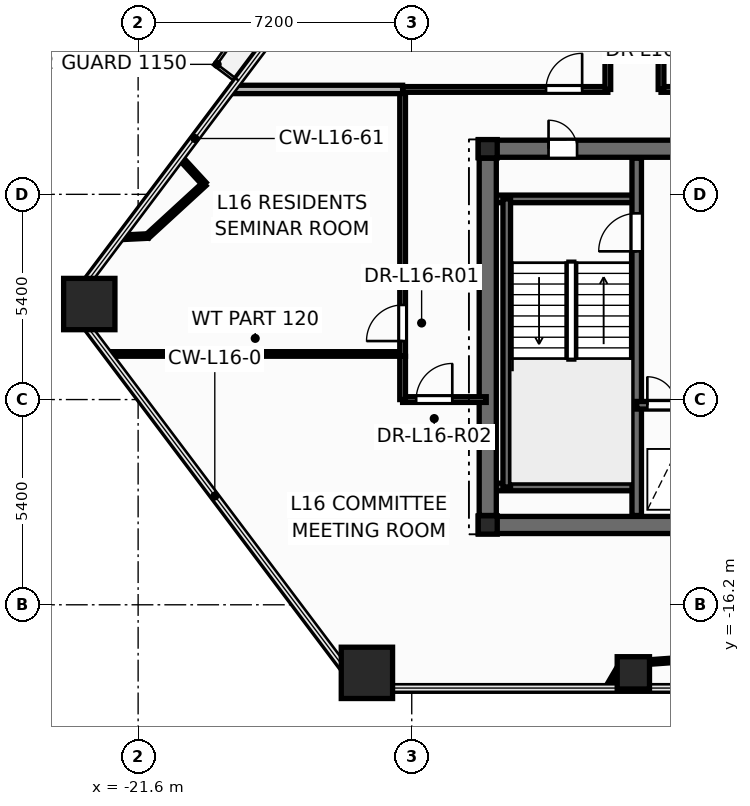
"""IFC4 building model, lengths in metres.
Left out: names, types, materials, properties, quantities, classifications, styles, units other than length and angle.
Written with IfcOpenShell. Run it as: python <this file> out.ifc"""

import sys

from ifc_helpers import new_model, si_unit, direction, frame, frame_2d, origin, origin_2d, place, context, subcontext, project, spatial, rectangle, hollow_rectangle, hollow_circle, i_section, extrude, element, fill, save


model = new_model("IFC4")
c1 = context("Model", 3, precision=1e-05, world=origin(), true_north=direction((0.0, 1.0)))
c2 = subcontext(c1, "Body", "Model", "MODEL_VIEW")
j1 = project(units=[si_unit("LENGTHUNIT", "METRE"), si_unit("PLANEANGLEUNIT", "RADIAN")], contexts=[c1])
p1 = place(None, origin())
s1 = spatial("IfcSite", under=j1, at=p1, CompositionType="ELEMENT")
p2 = place(p1, origin())
s2 = spatial("IfcBuilding", under=s1, at=p2, CompositionType="ELEMENT")
p3 = place(p2, frame((0.0, 0.0, 64.8)))
s3 = spatial("IfcBuildingStorey", under=s2, at=p3, CompositionType="ELEMENT", Elevation=64.8)
for number, where, z_axis, x_axis in (
    (1, (-22.885, -8.287, 0.0), (0.0, 0.0, 1.0), (1.0, 0.0, 0.0)),
    (2, (-15.58, -17.991, 0.0), (0.0, 0.0, 1.0), (1.0, 0.0, 0.0)),
):
    element("IfcColumn", number, at=place(p3, frame(where, z_axis=z_axis, x_axis=x_axis)), inside=s3, PredefinedType="COLUMN", context=c2, shape_type="SweptSolid", body=[
        extrude(hollow_rectangle(XDim=1.35, YDim=1.35, WallThickness=0.065, at=origin_2d()), origin(), (0.0, 0.0, 1.0), 3.6),
    ])
p4 = place(p3, frame((-8.569, -17.991, 0.0), z_axis=(0.0, 0.0, 1.0), x_axis=(1.0, 0.0, 0.0)))
e3 = element("IfcColumn", 3, at=p4, inside=s3, PredefinedType="COLUMN", context=c2, shape_type="SweptSolid", body=[
    extrude(hollow_circle(Radius=0.425, WallThickness=0.038, at=origin_2d()), origin(), (0.0, 0.0, 1.0), 3.6),
])
for number, where, z_axis, x_axis in (
    (4, (-12.4, -14.1, 0.0), (0.0, 0.0, 1.0), (1.0, 0.0, 0.0)),
    (5, (-12.4, -4.2, 0.0), (0.0, 0.0, 1.0), (1.0, 0.0, 0.0)),
):
    element("IfcColumn", number, at=place(p3, frame(where, z_axis=z_axis, x_axis=x_axis)), inside=s3, PredefinedType="COLUMN", context=c2, shape_type="SweptSolid", body=[
        extrude(i_section(OverallWidth=0.5, OverallDepth=0.482, WebThickness=0.04, FlangeThickness=0.045, at=origin_2d()), origin(), (0.0, 0.0, 1.0), 3.6),
    ])
p5 = place(p3, frame((-12.65, -14.1, 0.0), z_axis=(0.0, 0.0, 1.0), x_axis=(1.0, 0.0, 0.0)))
e6 = element("IfcWall", 6, at=p5, inside=s3, PredefinedType="SHEAR", context=c2, shape_type="SweptSolid", body=[
    extrude(rectangle(XDim=25.3, YDim=0.45, at=frame_2d((12.65, 0.0))), origin(), (0.0, 0.0, 1.0), 3.6),
])
p6 = place(p3, frame((-12.65, -4.2, 0.0), z_axis=(0.0, 0.0, 1.0), x_axis=(1.0, 0.0, 0.0)))
e7 = element("IfcWall", 7, at=p6, inside=s3, PredefinedType="SHEAR", context=c2, shape_type="SweptSolid", body=[
    extrude(rectangle(XDim=25.3, YDim=0.45, at=frame_2d((12.65, 0.0))), origin(), (0.0, 0.0, 1.0), 3.6),
])
p7 = place(p6, frame((1.85, 0.0, 0.0)))
e8 = element("IfcOpeningElement", 8, at=p7, cuts=e7, PredefinedType="OPENING", context=c2, shape_type="SweptSolid", body=[
    extrude(rectangle(XDim=0.756, YDim=2.054, at=frame_2d((0.375, 1.027))), frame((0.0, 0.235, 0.0), z_axis=(0.0, -1.0, 0.0), x_axis=(1.0, 0.0, 0.0)), (0.0, 0.0, 1.0), 0.47),
])
p8 = place(p6, frame((21.85, 0.0, 0.0)))
e9 = element("IfcOpeningElement", 9, at=p8, cuts=e7, PredefinedType="OPENING", context=c2, shape_type="SweptSolid", body=[
    extrude(rectangle(XDim=0.756, YDim=2.054, at=frame_2d((0.375, 1.027))), frame((0.0, 0.235, 0.0), z_axis=(0.0, -1.0, 0.0), x_axis=(1.0, 0.0, 0.0)), (0.0, 0.0, 1.0), 0.47),
])
p9 = place(p6, frame((23.5, 0.0, 0.0)))
e10 = element("IfcOpeningElement", 10, at=p9, cuts=e7, PredefinedType="OPENING", context=c2, shape_type="SweptSolid", body=[
    extrude(rectangle(XDim=0.756, YDim=2.054, at=frame_2d((0.375, 1.027))), frame((0.0, 0.235, 0.0), z_axis=(0.0, -1.0, 0.0), x_axis=(1.0, 0.0, 0.0)), (0.0, 0.0, 1.0), 0.47),
])
p10 = place(p6, frame((5.85, 0.0, 0.0)))
e11 = element("IfcOpeningElement", 11, at=p10, cuts=e7, PredefinedType="OPENING", context=c2, shape_type="SweptSolid", body=[
    extrude(rectangle(XDim=1.006, YDim=2.104, at=frame_2d((0.5, 1.052))), frame((0.0, 0.235, 0.0), z_axis=(0.0, -1.0, 0.0), x_axis=(1.0, 0.0, 0.0)), (0.0, 0.0, 1.0), 0.47),
])
p11 = place(p6, frame((10.35, 0.0, 0.0)))
e12 = element("IfcOpeningElement", 12, at=p11, cuts=e7, PredefinedType="OPENING", context=c2, shape_type="SweptSolid", body=[
    extrude(rectangle(XDim=1.406, YDim=2.154, at=frame_2d((0.7, 1.077))), frame((0.0, 0.235, 0.0), z_axis=(0.0, -1.0, 0.0), x_axis=(1.0, 0.0, 0.0)), (0.0, 0.0, 1.0), 0.47),
])
p12 = place(p6, frame((18.45, 0.0, 0.0)))
e13 = element("IfcOpeningElement", 13, at=p12, cuts=e7, PredefinedType="OPENING", context=c2, shape_type="SweptSolid", body=[
    extrude(rectangle(XDim=1.006, YDim=2.104, at=frame_2d((0.5, 1.052))), frame((0.0, 0.235, 0.0), z_axis=(0.0, -1.0, 0.0), x_axis=(1.0, 0.0, 0.0)), (0.0, 0.0, 1.0), 0.47),
])
for number, where, z_axis, x_axis in (
    (14, (-12.35, -5.52, 0.0), (0.0, 0.0, 1.0), (1.0, 0.0, 0.0)),
    (15, (-12.35, -13.1, 0.0), (0.0, 0.0, 1.0), (1.0, 0.0, 0.0)),
):
    element("IfcWall", number, at=place(p3, frame(where, z_axis=z_axis, x_axis=x_axis)), inside=s3, PredefinedType="SOLIDWALL", context=c2, shape_type="SweptSolid", body=[
        extrude(rectangle(XDim=3.87, YDim=0.2, at=frame_2d((1.935, 0.0))), origin(), (0.0, 0.0, 1.0), 3.6),
    ])
p13 = place(p3, frame((-11.9, -13.1, 0.0), z_axis=(0.0, 0.0, 1.0), x_axis=(0.0, 1.0, 0.0)))
e16 = element("IfcWall", 16, at=p13, inside=s3, PredefinedType="SOLIDWALL", context=c2, shape_type="SweptSolid", body=[
    extrude(rectangle(XDim=7.58, YDim=0.2, at=frame_2d((3.79, 0.0))), origin(), (0.0, 0.0, 1.0), 3.6),
])
p14 = place(p3, frame((-8.48, -13.85, 0.0), z_axis=(0.0, 0.0, 1.0), x_axis=(0.0, 1.0, 0.0)))
e17 = element("IfcWall", 17, at=p14, inside=s3, PredefinedType="SHEAR", context=c2, shape_type="SweptSolid", body=[
    extrude(rectangle(XDim=9.4, YDim=0.25, at=frame_2d((4.7, 0.0))), origin(), (0.0, 0.0, 1.0), 3.6),
])
p15 = place(p14, frame((6.95, 0.0, 0.0)))
e18 = element("IfcOpeningElement", 18, at=p15, cuts=e17, PredefinedType="OPENING", context=c2, shape_type="SweptSolid", body=[
    extrude(rectangle(XDim=1.006, YDim=2.104, at=frame_2d((0.5, 1.052))), frame((0.0, 0.135, 0.0), z_axis=(0.0, -1.0, 0.0), x_axis=(1.0, 0.0, 0.0)), (0.0, 0.0, 1.0), 0.27),
])
p16 = place(p3, frame((-8.48, -10.95, 0.0), z_axis=(0.0, 0.0, 1.0), x_axis=(1.0, 0.0, 0.0)))
e19 = element("IfcWall", 19, at=p16, inside=s3, PredefinedType="SOLIDWALL", context=c2, shape_type="SweptSolid", body=[
    extrude(rectangle(XDim=3.36, YDim=0.2, at=frame_2d((1.68, 0.0))), origin(), (0.0, 0.0, 1.0), 3.6),
])
p17 = place(p16, frame((0.28, 0.0, 0.0)))
e20 = element("IfcOpeningElement", 20, at=p17, cuts=e19, PredefinedType="OPENING", context=c2, shape_type="SweptSolid", body=[
    extrude(rectangle(XDim=0.756, YDim=2.054, at=frame_2d((0.375, 1.027))), frame((0.0, 0.11, 0.0), z_axis=(0.0, -1.0, 0.0), x_axis=(1.0, 0.0, 0.0)), (0.0, 0.0, 1.0), 0.22),
])
p18 = place(p16, frame((1.85, 0.0, 0.0)))
e21 = element("IfcOpeningElement", 21, at=p18, cuts=e19, PredefinedType="OPENING", context=c2, shape_type="SweptSolid", body=[
    extrude(rectangle(XDim=1.106, YDim=2.104, at=frame_2d((0.55, 1.052))), frame((0.0, 0.11, 0.0), z_axis=(0.0, -1.0, 0.0), x_axis=(1.0, 0.0, 0.0)), (0.0, 0.0, 1.0), 0.22),
])
p19 = place(p3, frame((-12.4, -13.85, 0.0), z_axis=(0.0, 0.0, 1.0), x_axis=(0.0, 1.0, 0.0)))
e22 = element("IfcWall", 22, at=p19, inside=s3, PredefinedType="SHEAR", context=c2, shape_type="SweptSolid", body=[
    extrude(rectangle(XDim=9.4, YDim=0.45, at=frame_2d((4.7, 0.0))), origin(), (0.0, 0.0, 1.0), 3.6),
])
p20 = place(p3, frame((-7.84, -2.64, 0.0), z_axis=(0.0, 0.0, 1.0), x_axis=(1.0, 0.0, 0.0)))
e23 = element("IfcWall", 23, at=p20, inside=s3, PredefinedType="PARTITIONING", context=c2, shape_type="SweptSolid", body=[
    extrude(rectangle(XDim=13.84, YDim=0.15, at=frame_2d((6.92, 0.0))), origin(), (0.0, 0.0, 1.0), 2.325),
])
p21 = place(p20, frame((2.115, 0.0, 0.0)))
e24 = element("IfcOpeningElement", 24, at=p21, cuts=e23, PredefinedType="OPENING", context=c2, shape_type="SweptSolid", body=[
    extrude(rectangle(XDim=0.956, YDim=2.104, at=frame_2d((0.475, 1.052))), frame((0.0, 0.085, 0.0), z_axis=(0.0, -1.0, 0.0), x_axis=(1.0, 0.0, 0.0)), (0.0, 0.0, 1.0), 0.17),
])
p22 = place(p3, frame((-7.84, -2.64, 0.0), z_axis=(0.0, 0.0, 1.0), x_axis=(0.0, 1.0, 0.0)))
e25 = element("IfcWall", 25, at=p22, inside=s3, PredefinedType="PARTITIONING", context=c2, shape_type="SweptSolid", body=[
    extrude(rectangle(XDim=8.84, YDim=0.15, at=frame_2d((4.42, 0.0))), origin(), (0.0, 0.0, 1.0), 2.325),
])
p23 = place(p3, frame((-22.397, -9.6, 0.0), z_axis=(0.0, 0.0, 1.0), x_axis=(1.0, 0.0, 0.0)))
e26 = element("IfcWall", 26, at=p23, inside=s3, PredefinedType="PARTITIONING", context=c2, shape_type="SweptSolid", body=[
    extrude(rectangle(XDim=7.757, YDim=0.12, at=frame_2d((3.879, 0.0))), origin(), (0.0, 0.0, 1.0), 2.713),
])
p24 = place(p3, frame((-14.64, -9.66, 0.0), z_axis=(0.0, 0.0, 1.0), x_axis=(0.0, 1.0, 0.0)))
e27 = element("IfcWall", 27, at=p24, inside=s3, PredefinedType="PARTITIONING", context=c2, shape_type="SweptSolid", body=[
    extrude(rectangle(XDim=7.02, YDim=0.15, at=frame_2d((3.51, 0.0))), origin(), (0.0, 0.0, 1.0), 2.325),
])
p25 = place(p24, frame((0.399, 0.0, 0.0)))
e28 = element("IfcOpeningElement", 28, at=p25, cuts=e27, PredefinedType="OPENING", context=c2, shape_type="SweptSolid", body=[
    extrude(rectangle(XDim=0.956, YDim=2.104, at=frame_2d((0.475, 1.052))), frame((0.0, 0.085, 0.0), z_axis=(0.0, -1.0, 0.0), x_axis=(1.0, 0.0, 0.0)), (0.0, 0.0, 1.0), 0.17),
])
p26 = place(p3, frame((-14.64, -2.64, 0.0), z_axis=(0.0, 0.0, 1.0), x_axis=(1.0, 0.0, 0.0)))
e29 = element("IfcWall", 29, at=p26, inside=s3, PredefinedType="PARTITIONING", context=c2, shape_type="SweptSolid", body=[
    extrude(rectangle(XDim=5.4, YDim=0.15, at=frame_2d((2.7, 0.0))), origin(), (0.0, 0.0, 1.0), 3.35),
])
p27 = place(p26, frame((3.774, 0.0, 0.0)))
e30 = element("IfcOpeningElement", 30, at=p27, cuts=e29, PredefinedType="OPENING", context=c2, shape_type="SweptSolid", body=[
    extrude(rectangle(XDim=0.956, YDim=2.104, at=frame_2d((0.475, 1.052))), frame((0.0, 0.085, 0.0), z_axis=(0.0, -1.0, 0.0), x_axis=(1.0, 0.0, 0.0)), (0.0, 0.0, 1.0), 0.17),
])
p28 = place(p3, frame((-9.24, -2.64, 0.0), z_axis=(0.0, 0.0, 1.0), x_axis=(0.0, 1.0, 0.0)))
e31 = element("IfcWall", 31, at=p28, inside=s3, PredefinedType="PARTITIONING", context=c2, shape_type="SweptSolid", body=[
    extrude(rectangle(XDim=8.84, YDim=0.15, at=frame_2d((4.42, 0.0))), origin(), (0.0, 0.0, 1.0), 2.325),
])
p29 = place(p3, frame((-19.135, -2.64, 0.0), z_axis=(0.0, 0.0, 1.0), x_axis=(1.0, 0.0, 0.0)))
e32 = element("IfcWall", 32, at=p29, inside=s3, PredefinedType="PARTITIONING", context=c2, shape_type="SweptSolid", body=[
    extrude(rectangle(XDim=4.495, YDim=0.22, at=frame_2d((2.248, 0.0))), origin(), (0.0, 0.0, 1.0), 2.713),
])
p30 = place(p3, frame((-8.879, -17.759, 0.0), z_axis=(0.0, 0.0, 1.0), x_axis=(0.997421304673, 0.071768662969, 0.0)))
e33 = element("IfcWall", 33, at=p30, inside=s3, PredefinedType="PARTITIONING", context=c2, shape_type="SweptSolid", body=[
    extrude(rectangle(XDim=3.293, YDim=0.12, at=frame_2d((1.646, 0.0))), origin(), (0.0, 0.0, 1.0), 2.325),
])
p31 = place(p3, frame((-14.64, -10.8, 0.0), z_axis=(0.0, 0.0, 1.0), x_axis=(1.0, 0.0, 0.0)))
e34 = element("IfcWall", 34, at=p31, inside=s3, PredefinedType="PARTITIONING", context=c2, shape_type="SweptSolid", body=[
    extrude(rectangle(XDim=2.2, YDim=0.15, at=frame_2d((1.1, 0.0))), origin(), (0.0, 0.0, 1.0), 2.713),
])
p32 = place(p31, frame((0.357, 0.0, 0.0)))
e35 = element("IfcOpeningElement", 35, at=p32, cuts=e34, PredefinedType="OPENING", context=c2, shape_type="SweptSolid", body=[
    extrude(rectangle(XDim=0.956, YDim=2.104, at=frame_2d((0.475, 1.052))), frame((0.0, 0.085, 0.0), z_axis=(0.0, -1.0, 0.0), x_axis=(1.0, 0.0, 0.0)), (0.0, 0.0, 1.0), 0.17),
])
p33 = place(p3, frame((-19.855, -5.128, 0.0), z_axis=(0.0, 0.0, 1.0), x_axis=(-0.736728490611, -0.67618868012, 0.0)))
e36 = element("IfcWall", 36, at=p33, inside=s3, PredefinedType="PARTITIONING", context=c2, shape_type="SweptSolid", body=[
    extrude(rectangle(XDim=2.024, YDim=0.12, at=frame_2d((1.012, 0.0))), origin(), (0.0, 0.0, 1.0), 3.35),
])
p34 = place(p3, frame((-14.64, -10.8, 0.0), z_axis=(0.0, 0.0, 1.0), x_axis=(0.0, 1.0, 0.0)))
e37 = element("IfcWall", 37, at=p34, inside=s3, PredefinedType="PARTITIONING", context=c2, shape_type="SweptSolid", body=[
    extrude(rectangle(XDim=1.138, YDim=0.15, at=frame_2d((0.569, 0.0))), origin(), (0.0, 0.0, 1.0), 3.35),
])
p35 = place(p3, frame((-20.482, -4.446, 0.0), z_axis=(0.0, 0.0, 1.0), x_axis=(0.676154076812, -0.736760248935, 0.0)))
e38 = element("IfcWall", 38, at=p35, inside=s3, PredefinedType="PARTITIONING", context=c2, shape_type="SweptSolid", body=[
    extrude(rectangle(XDim=0.927, YDim=0.12, at=frame_2d((0.463, 0.0))), origin(), (0.0, 0.0, 1.0), 2.713),
])
p36 = place(p3, frame((-9.243, -18.381, 0.0), z_axis=(0.0, 0.0, 1.0), x_axis=(0.504649985928, 0.863324036329, 0.0)))
e39 = element("IfcWall", 39, at=p36, inside=s3, PredefinedType="PARTITIONING", context=c2, shape_type="SweptSolid", body=[
    extrude(rectangle(XDim=0.721, YDim=0.12, at=frame_2d((0.36, 0.0))), origin(), (0.0, 0.0, 1.0), 2.325),
])
p37 = place(p3, frame((-21.347, -6.497, 0.0), z_axis=(0.0, 0.0, 1.0), x_axis=(-0.998778903867, -0.049403453218, 0.0)))
e40 = element("IfcWall", 40, at=p37, inside=s3, PredefinedType="PARTITIONING", context=c2, shape_type="SweptSolid", body=[
    extrude(rectangle(XDim=0.707, YDim=0.12, at=frame_2d((0.354, 0.0))), origin(), (0.0, 0.0, 1.0), 2.713),
])
p38 = place(p15, origin())
e41 = element("IfcDoor", 41, at=p38, inside=s3, OperationType="SINGLE_SWING_LEFT", PredefinedType="DOOR", context=c2, shape_type="SweptSolid", body=[
    extrude(rectangle(XDim=1.0, YDim=2.1, at=frame_2d((0.5, 1.05))), frame((0.0, 0.025, 0.0), z_axis=(0.0, -1.0, 0.0), x_axis=(1.0, 0.0, 0.0)), (0.0, 0.0, 1.0), 0.05),
])
fill(e18, e41)
p39 = place(p17, origin())
e42 = element("IfcDoor", 42, at=p39, inside=s3, OperationType="SINGLE_SWING_LEFT", PredefinedType="DOOR", context=c2, shape_type="SweptSolid", body=[
    extrude(rectangle(XDim=0.75, YDim=2.05, at=frame_2d((0.375, 1.025))), frame((0.0, 0.025, 0.0), z_axis=(0.0, -1.0, 0.0), x_axis=(1.0, 0.0, 0.0)), (0.0, 0.0, 1.0), 0.05),
])
fill(e20, e42)
p40 = place(p7, origin())
e43 = element("IfcDoor", 43, at=p40, inside=s3, OperationType="SINGLE_SWING_LEFT", PredefinedType="DOOR", context=c2, shape_type="SweptSolid", body=[
    extrude(rectangle(XDim=0.75, YDim=2.05, at=frame_2d((0.375, 1.025))), frame((0.0, 0.025, 0.0), z_axis=(0.0, -1.0, 0.0), x_axis=(1.0, 0.0, 0.0)), (0.0, 0.0, 1.0), 0.05),
])
fill(e8, e43)
p41 = place(p25, origin())
e44 = element("IfcDoor", 44, at=p41, inside=s3, OperationType="SINGLE_SWING_LEFT", PredefinedType="DOOR", context=c2, shape_type="SweptSolid", body=[
    extrude(rectangle(XDim=0.95, YDim=2.1, at=frame_2d((0.475, 1.05))), frame((0.0, 0.025, 0.0), z_axis=(0.0, -1.0, 0.0), x_axis=(1.0, 0.0, 0.0)), (0.0, 0.0, 1.0), 0.05),
])
fill(e28, e44)
p42 = place(p32, origin())
e45 = element("IfcDoor", 45, at=p42, inside=s3, OperationType="SINGLE_SWING_RIGHT", PredefinedType="DOOR", context=c2, shape_type="SweptSolid", body=[
    extrude(rectangle(XDim=0.95, YDim=2.1, at=frame_2d((0.475, 1.05))), frame((0.0, 0.025, 0.0), z_axis=(0.0, -1.0, 0.0), x_axis=(1.0, 0.0, 0.0)), (0.0, 0.0, 1.0), 0.05),
])
fill(e35, e45)
p43 = place(p27, origin())
e46 = element("IfcDoor", 46, at=p43, inside=s3, OperationType="SINGLE_SWING_RIGHT", PredefinedType="DOOR", context=c2, shape_type="SweptSolid", body=[
    extrude(rectangle(XDim=0.95, YDim=2.1, at=frame_2d((0.475, 1.05))), frame((0.0, 0.025, 0.0), z_axis=(0.0, -1.0, 0.0), x_axis=(1.0, 0.0, 0.0)), (0.0, 0.0, 1.0), 0.05),
])
fill(e30, e46)
save(model, sys.argv[1])
